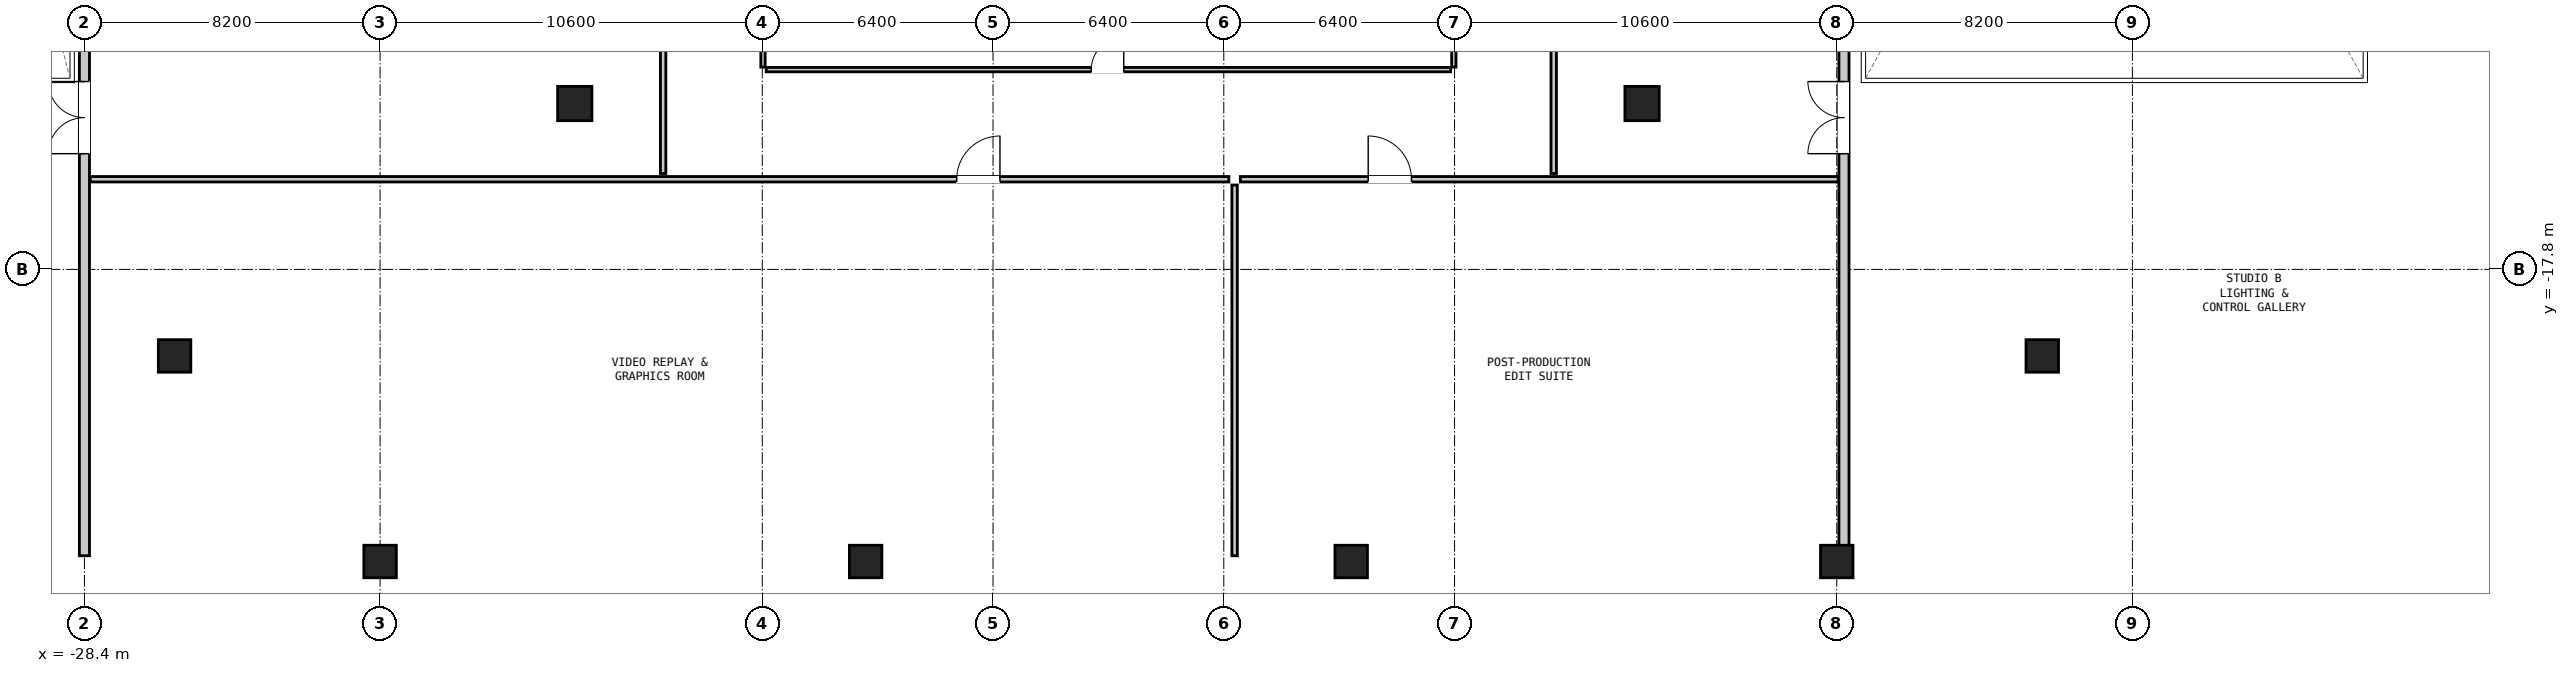
"""IFC4 building model, lengths in metres.
Left out: names, types, materials, properties, quantities, classifications, styles, units other than length and angle.
Written with IfcOpenShell. Run it as: python <this file> out.ifc"""

import sys

from ifc_helpers import new_model, si_unit, direction, frame, frame_2d, origin, origin_2d, place, context, subcontext, project, spatial, rectangle, hollow_rectangle, extrude, element, fill, save


model = new_model("IFC4")
c1 = context("Model", 3, precision=1e-05, world=origin(), true_north=direction((0.0, 1.0)))
c2 = subcontext(c1, "Body", "Model", "MODEL_VIEW")
j1 = project(units=[si_unit("LENGTHUNIT", "METRE"), si_unit("PLANEANGLEUNIT", "RADIAN")], contexts=[c1])
p1 = place(None, origin())
s1 = spatial("IfcSite", under=j1, at=p1, CompositionType="ELEMENT")
p2 = place(p1, origin())
s2 = spatial("IfcBuilding", under=s1, at=p2, CompositionType="ELEMENT")
p3 = place(p2, frame((0.0, 0.0, 9.3)))
s3 = spatial("IfcBuildingStorey", under=s2, at=p3, CompositionType="ELEMENT", Elevation=9.3)
for number, where, z_axis, x_axis in (
    (1, (-14.8, -13.2, 0.0), (0.0, 0.0, 1.0), (1.0, 0.0, 0.0)),
    (2, (14.8, -13.2, 0.0), (0.0, 0.0, 1.0), (1.0, 0.0, 0.0)),
):
    element("IfcColumn", number, at=place(p3, frame(where, z_axis=z_axis, x_axis=x_axis)), inside=s3, PredefinedType="COLUMN", context=c2, shape_type="SweptSolid", body=[
        extrude(hollow_rectangle(XDim=0.95, YDim=0.95, WallThickness=0.06, at=origin_2d()), origin(), (0.0, 0.0, 1.0), 4.2),
    ])
for number, where, z_axis, x_axis in (
    (3, (-20.2, -25.9, 0.0), (0.0, 0.0, 1.0), (1.0, 0.0, 0.0)),
    (4, (-6.733, -25.9, 0.0), (0.0, 0.0, 1.0), (1.0, 0.0, 0.0)),
    (5, (6.733, -25.9, 0.0), (0.0, 0.0, 1.0), (1.0, 0.0, 0.0)),
    (6, (20.2, -25.9, 0.0), (0.0, 0.0, 1.0), (1.0, 0.0, 0.0)),
    (7, (25.9, -20.2, 0.0), (0.0, 0.0, 1.0), (0.0, 1.0, 0.0)),
    (8, (-25.9, -20.2, 0.0), (0.0, 0.0, 1.0), (0.0, 1.0, 0.0)),
):
    element("IfcColumn", number, at=place(p3, frame(where, z_axis=z_axis, x_axis=x_axis)), inside=s3, PredefinedType="COLUMN", context=c2, shape_type="SweptSolid", body=[
        extrude(hollow_rectangle(XDim=0.9, YDim=0.9, WallThickness=0.055, at=origin_2d()), origin(), (0.0, 0.0, 1.0), 4.2),
    ])
p4 = place(p3, frame((-28.4, -25.74, 0.0), z_axis=(0.0, 0.0, 1.0), x_axis=(0.0, 1.0, 0.0)))
e9 = element("IfcWall", 9, at=p4, inside=s3, PredefinedType="MOVABLE", context=c2, shape_type="SweptSolid", body=[
    extrude(rectangle(XDim=51.48, YDim=0.28, at=frame_2d((25.74, 0.0))), origin(), (0.0, 0.0, 1.0), 3.88),
])
p5 = place(p4, frame((11.149, 0.0, 0.0)))
e10 = element("IfcOpeningElement", 10, at=p5, cuts=e9, PredefinedType="OPENING", context=c2, shape_type="SweptSolid", body=[
    extrude(rectangle(XDim=2.0, YDim=2.14, at=frame_2d((1.0, 1.07))), frame((0.0, 0.152, 0.0), z_axis=(0.0, -1.0, 0.0), x_axis=(1.0, 0.0, 0.0)), (0.0, 0.0, 1.0), 0.304),
])
p6 = place(p4, frame((38.64, 0.0, 0.0)))
e11 = element("IfcOpeningElement", 11, at=p6, cuts=e9, PredefinedType="OPENING", context=c2, shape_type="SweptSolid", body=[
    extrude(rectangle(XDim=2.0, YDim=2.14, at=frame_2d((1.0, 1.07))), frame((0.0, 0.152, 0.0), z_axis=(0.0, -1.0, 0.0), x_axis=(1.0, 0.0, 0.0)), (0.0, 0.0, 1.0), 0.304),
])
p7 = place(p3, frame((20.4, -25.74, 0.0), z_axis=(0.0, 0.0, 1.0), x_axis=(0.0, 1.0, 0.0)))
e12 = element("IfcWall", 12, at=p7, inside=s3, PredefinedType="MOVABLE", context=c2, shape_type="SweptSolid", body=[
    extrude(rectangle(XDim=51.48, YDim=0.28, at=frame_2d((25.74, 0.0))), origin(), (0.0, 0.0, 1.0), 2.933),
])
p8 = place(p7, frame((11.149, 0.0, 0.0)))
e13 = element("IfcOpeningElement", 13, at=p8, cuts=e12, PredefinedType="OPENING", context=c2, shape_type="SweptSolid", body=[
    extrude(rectangle(XDim=2.0, YDim=2.14, at=frame_2d((1.0, 1.07))), frame((0.0, 0.152, 0.0), z_axis=(0.0, -1.0, 0.0), x_axis=(1.0, 0.0, 0.0)), (0.0, 0.0, 1.0), 0.304),
])
p9 = place(p7, frame((38.64, 0.0, 0.0)))
e14 = element("IfcOpeningElement", 14, at=p9, cuts=e12, PredefinedType="OPENING", context=c2, shape_type="SweptSolid", body=[
    extrude(rectangle(XDim=2.0, YDim=2.14, at=frame_2d((1.0, 1.07))), frame((0.0, 0.152, 0.0), z_axis=(0.0, -1.0, 0.0), x_axis=(1.0, 0.0, 0.0)), (0.0, 0.0, 1.0), 0.304),
])
p10 = place(p3, frame((-28.24, -15.3, 0.0), z_axis=(0.0, 0.0, 1.0), x_axis=(1.0, 0.0, 0.0)))
e15 = element("IfcWall", 15, at=p10, inside=s3, PredefinedType="PARTITIONING", context=c2, shape_type="SweptSolid", body=[
    extrude(rectangle(XDim=31.58, YDim=0.15, at=frame_2d((15.79, 0.0))), origin(), (0.0, 0.0, 1.0), 3.88),
])
p11 = place(p10, frame((24.032, 0.0, 0.0)))
e16 = element("IfcOpeningElement", 16, at=p11, cuts=e15, PredefinedType="OPENING", context=c2, shape_type="SweptSolid", body=[
    extrude(rectangle(XDim=1.2, YDim=2.1, at=frame_2d((0.6, 1.05))), frame((0.0, 0.087, 0.0), z_axis=(0.0, -1.0, 0.0), x_axis=(1.0, 0.0, 0.0)), (0.0, 0.0, 1.0), 0.174),
])
p12 = place(p3, frame((3.66, -15.3, 0.0), z_axis=(0.0, 0.0, 1.0), x_axis=(1.0, 0.0, 0.0)))
e17 = element("IfcWall", 17, at=p12, inside=s3, PredefinedType="PARTITIONING", context=c2, shape_type="SweptSolid", body=[
    extrude(rectangle(XDim=16.58, YDim=0.15, at=frame_2d((8.29, 0.0))), origin(), (0.0, 0.0, 1.0), 3.88),
])
p13 = place(p12, frame((3.545, 0.0, 0.0)))
e18 = element("IfcOpeningElement", 18, at=p13, cuts=e17, PredefinedType="OPENING", context=c2, shape_type="SweptSolid", body=[
    extrude(rectangle(XDim=1.2, YDim=2.1, at=frame_2d((0.6, 1.05))), frame((0.0, 0.087, 0.0), z_axis=(0.0, -1.0, 0.0), x_axis=(1.0, 0.0, 0.0)), (0.0, 0.0, 1.0), 0.174),
])
p14 = place(p3, frame((3.5, -25.74, 0.0), z_axis=(0.0, 0.0, 1.0), x_axis=(0.0, 1.0, 0.0)))
e19 = element("IfcWall", 19, at=p14, inside=s3, PredefinedType="PARTITIONING", context=c2, shape_type="SweptSolid", body=[
    extrude(rectangle(XDim=10.28, YDim=0.15, at=frame_2d((5.14, 0.0))), origin(), (0.0, 0.0, 1.0), 3.88),
])
p15 = place(p3, frame((-12.35, -15.14, 0.0), z_axis=(0.0, 0.0, 1.0), x_axis=(0.0, 1.0, 0.0)))
e20 = element("IfcWall", 20, at=p15, inside=s3, PredefinedType="PARTITIONING", context=c2, shape_type="SweptSolid", body=[
    extrude(rectangle(XDim=12.58, YDim=0.15, at=frame_2d((6.29, 0.0))), origin(), (0.0, 0.0, 1.0), 3.88),
])
p16 = place(p15, frame((5.815, 0.0, 0.0)))
e21 = element("IfcOpeningElement", 21, at=p16, cuts=e20, PredefinedType="OPENING", context=c2, shape_type="SweptSolid", body=[
    extrude(rectangle(XDim=0.95, YDim=2.1, at=frame_2d((0.475, 1.05))), frame((0.0, 0.087, 0.0), z_axis=(0.0, -1.0, 0.0), x_axis=(1.0, 0.0, 0.0)), (0.0, 0.0, 1.0), 0.174),
])
p17 = place(p3, frame((12.35, -15.14, 0.0), z_axis=(0.0, 0.0, 1.0), x_axis=(0.0, 1.0, 0.0)))
e22 = element("IfcWall", 22, at=p17, inside=s3, PredefinedType="PARTITIONING", context=c2, shape_type="SweptSolid", body=[
    extrude(rectangle(XDim=12.6, YDim=0.15, at=frame_2d((6.3, 0.0))), origin(), (0.0, 0.0, 1.0), 3.88),
])
p18 = place(p17, frame((5.825, 0.0, 0.0)))
e23 = element("IfcOpeningElement", 23, at=p18, cuts=e22, PredefinedType="OPENING", context=c2, shape_type="SweptSolid", body=[
    extrude(rectangle(XDim=0.95, YDim=2.1, at=frame_2d((0.475, 1.05))), frame((0.0, 0.087, 0.0), z_axis=(0.0, -1.0, 0.0), x_axis=(1.0, 0.0, 0.0)), (0.0, 0.0, 1.0), 0.174),
])
p19 = place(p3, frame((-9.49, -12.26, 0.0), z_axis=(0.0, 0.0, 1.0), x_axis=(1.0, 0.0, 0.0)))
e24 = element("IfcWall", 24, at=p19, inside=s3, PredefinedType="PARTITIONING", context=c2, shape_type="SweptSolid", body=[
    extrude(rectangle(XDim=18.98, YDim=0.12, at=frame_2d((9.49, 0.0))), origin(), (0.0, 0.0, 1.0), 3.88),
])
p20 = place(p19, frame((9.015, 0.0, 0.0)))
e25 = element("IfcOpeningElement", 25, at=p20, cuts=e24, PredefinedType="OPENING", context=c2, shape_type="SweptSolid", body=[
    extrude(rectangle(XDim=0.9, YDim=2.05, at=frame_2d((0.45, 1.025))), frame((0.0, 0.072, 0.0), z_axis=(0.0, -1.0, 0.0), x_axis=(1.0, 0.0, 0.0)), (0.0, 0.0, 1.0), 0.144),
])
for number, where, z_axis, x_axis in (
    (26, (-9.58, -12.19, 0.0), (0.0, 0.0, 1.0), (0.0, 1.0, 0.0)),
    (27, (9.58, -12.19, 0.0), (0.0, 0.0, 1.0), (0.0, 1.0, 0.0)),
):
    element("IfcWall", number, at=place(p3, frame(where, z_axis=z_axis, x_axis=x_axis)), inside=s3, PredefinedType="PARTITIONING", context=c2, shape_type="SweptSolid", body=[
        extrude(rectangle(XDim=3.08, YDim=0.12, at=frame_2d((1.54, 0.0))), origin(), (0.0, 0.0, 1.0), 3.88),
    ])
p21 = place(p5, origin())
e28 = element("IfcDoor", 28, at=p21, inside=s3, OperationType="DOUBLE_DOOR_SINGLE_SWING", PredefinedType="DOOR", context=c2, shape_type="SweptSolid", body=[
    extrude(rectangle(XDim=2.0, YDim=2.14, at=frame_2d((1.0, 1.07))), frame((0.0, 0.025, 0.0), z_axis=(0.0, -1.0, 0.0), x_axis=(1.0, 0.0, 0.0)), (0.0, 0.0, 1.0), 0.05),
])
fill(e10, e28)
p22 = place(p8, origin())
e29 = element("IfcDoor", 29, at=p22, inside=s3, OperationType="DOUBLE_DOOR_SINGLE_SWING", PredefinedType="DOOR", context=c2, shape_type="SweptSolid", body=[
    extrude(rectangle(XDim=2.0, YDim=2.14, at=frame_2d((1.0, 1.07))), frame((0.0, 0.025, 0.0), z_axis=(0.0, -1.0, 0.0), x_axis=(1.0, 0.0, 0.0)), (0.0, 0.0, 1.0), 0.05),
])
fill(e13, e29)
p23 = place(p11, origin())
e30 = element("IfcDoor", 30, at=p23, inside=s3, OperationType="SINGLE_SWING_RIGHT", PredefinedType="DOOR", context=c2, shape_type="SweptSolid", body=[
    extrude(rectangle(XDim=1.2, YDim=2.1, at=frame_2d((0.6, 1.05))), frame((0.0, 0.025, 0.0), z_axis=(0.0, -1.0, 0.0), x_axis=(1.0, 0.0, 0.0)), (0.0, 0.0, 1.0), 0.05),
])
fill(e16, e30)
p24 = place(p13, origin())
e31 = element("IfcDoor", 31, at=p24, inside=s3, OperationType="SINGLE_SWING_LEFT", PredefinedType="DOOR", context=c2, shape_type="SweptSolid", body=[
    extrude(rectangle(XDim=1.2, YDim=2.1, at=frame_2d((0.6, 1.05))), frame((0.0, 0.025, 0.0), z_axis=(0.0, -1.0, 0.0), x_axis=(1.0, 0.0, 0.0)), (0.0, 0.0, 1.0), 0.05),
])
fill(e18, e31)
p25 = place(p20, origin())
e32 = element("IfcDoor", 32, at=p25, inside=s3, OperationType="SINGLE_SWING_RIGHT", PredefinedType="DOOR", context=c2, shape_type="SweptSolid", body=[
    extrude(rectangle(XDim=0.9, YDim=2.05, at=frame_2d((0.45, 1.025))), frame((0.0, 0.025, 0.0), z_axis=(0.0, -1.0, 0.0), x_axis=(1.0, 0.0, 0.0)), (0.0, 0.0, 1.0), 0.05),
])
fill(e25, e32)
save(model, sys.argv[1])
